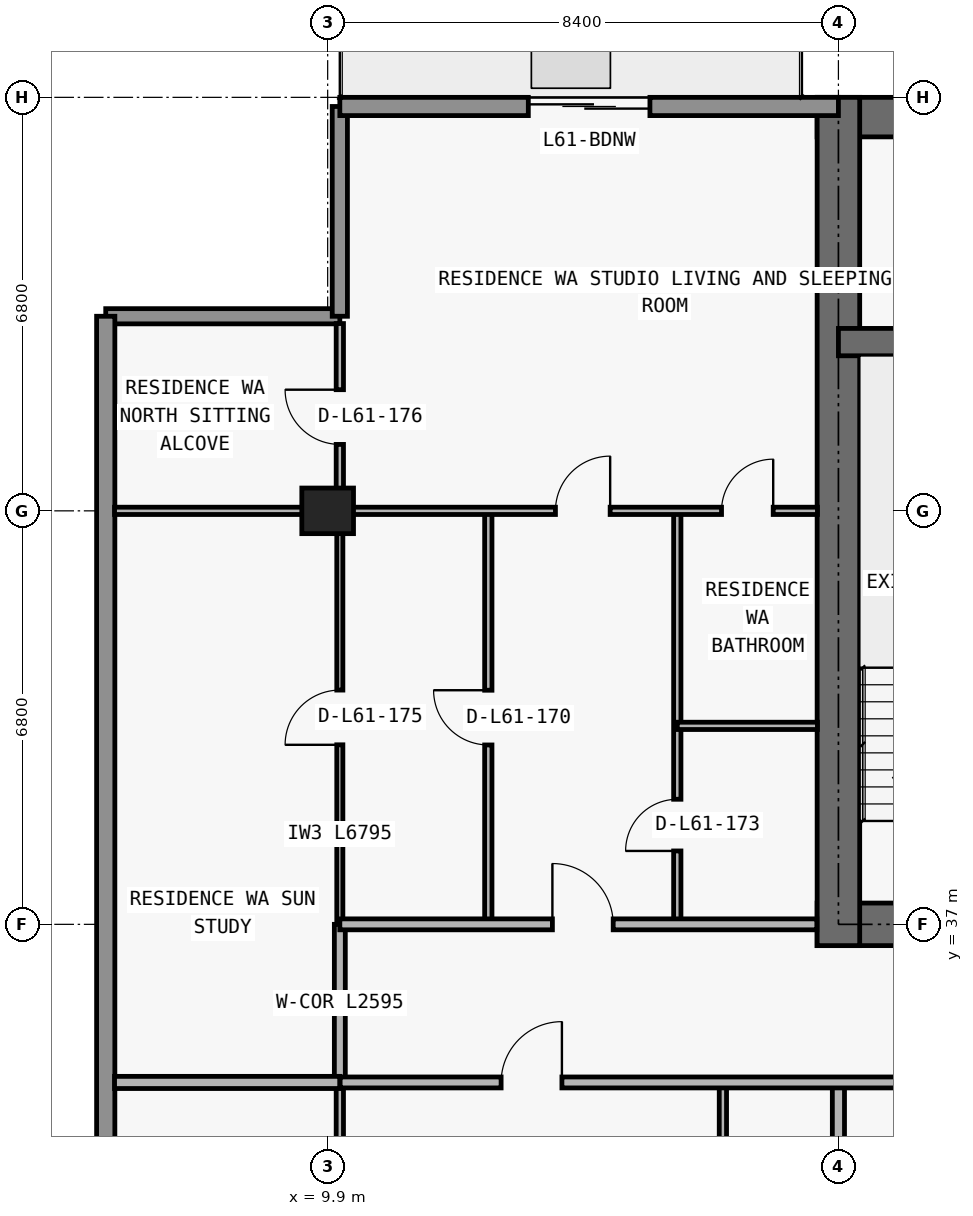
"""IFC4 building model, lengths in metres.
Left out: names, types, materials, properties, quantities, classifications, styles, units other than length and angle.
Written with IfcOpenShell. Run it as: python <this file> out.ifc"""

import sys

from ifc_helpers import new_model, si_unit, direction, frame, frame_2d, origin, origin_2d, place, context, subcontext, project, spatial, rectangle, extrude, element, fill, save


model = new_model("IFC4")
c1 = context("Model", 3, precision=1e-05, world=origin(), true_north=direction((0.0, 1.0)))
c2 = subcontext(c1, "Body", "Model", "MODEL_VIEW")
j1 = project(units=[si_unit("LENGTHUNIT", "METRE"), si_unit("PLANEANGLEUNIT", "RADIAN")], contexts=[c1])
p1 = place(None, origin())
s1 = spatial("IfcSite", under=j1, at=p1, CompositionType="ELEMENT")
p2 = place(p1, origin())
s2 = spatial("IfcBuilding", under=s1, at=p2, CompositionType="ELEMENT")
p3 = place(p2, frame((0.0, 0.0, 218.1)))
s3 = spatial("IfcBuildingStorey", under=s2, at=p3, CompositionType="ELEMENT", Elevation=218.1)
p4 = place(p3, frame((9.9, 43.8, 0.0), z_axis=(0.0, 0.0, 1.0), x_axis=(1.0, 0.0, 0.0)))
e1 = element("IfcColumn", 1, at=p4, inside=s3, PredefinedType="COLUMN", context=c2, shape_type="SweptSolid", body=[
    extrude(rectangle(XDim=0.85, YDim=0.75, at=origin_2d()), origin(), (0.0, 0.0, 1.0), 3.0),
])
p5 = place(p3, frame((17.95, 37.0, 0.0), z_axis=(0.0, 0.0, 1.0), x_axis=(1.0, 0.0, 0.0)))
e2 = element("IfcWall", 2, at=p5, inside=s3, PredefinedType="SHEAR", context=c2, shape_type="SweptSolid", body=[
    extrude(rectangle(XDim=41.9, YDim=0.7, at=frame_2d((20.95, 0.0))), origin(), (0.0, 0.0, 1.0), 3.0),
])
p6 = place(p5, frame((14.35, 0.0, 0.0)))
e3 = element("IfcOpeningElement", 3, at=p6, cuts=e2, PredefinedType="OPENING", context=c2, shape_type="SweptSolid", body=[
    extrude(rectangle(XDim=1.1, YDim=2.15, at=frame_2d((0.55, 1.075))), frame((0.0, 0.36, 0.0), z_axis=(0.0, -1.0, 0.0), x_axis=(1.0, 0.0, 0.0)), (0.0, 0.0, 1.0), 0.72),
])
p7 = place(p5, frame((6.2, 0.0, 0.0)))
e4 = element("IfcOpeningElement", 4, at=p7, cuts=e2, PredefinedType="OPENING", context=c2, shape_type="SweptSolid", body=[
    extrude(rectangle(XDim=1.05, YDim=2.15, at=frame_2d((0.525, 1.075))), frame((0.0, 0.36, 0.0), z_axis=(0.0, -1.0, 0.0), x_axis=(1.0, 0.0, 0.0)), (0.0, 0.0, 1.0), 0.72),
])
p8 = place(p5, frame((34.7, 0.0, 0.0)))
e5 = element("IfcOpeningElement", 5, at=p8, cuts=e2, PredefinedType="OPENING", context=c2, shape_type="SweptSolid", body=[
    extrude(rectangle(XDim=1.05, YDim=2.15, at=frame_2d((0.525, 1.075))), frame((0.0, 0.36, 0.0), z_axis=(0.0, -1.0, 0.0), x_axis=(1.0, 0.0, 0.0)), (0.0, 0.0, 1.0), 0.72),
])
p9 = place(p5, frame((10.812, 0.0, 0.0)))
e6 = element("IfcOpeningElement", 6, at=p9, cuts=e2, PredefinedType="OPENING", context=c2, shape_type="SweptSolid", body=[
    extrude(rectangle(XDim=1.05, YDim=2.15, at=frame_2d((0.525, 1.075))), frame((0.0, 0.36, 0.0), z_axis=(0.0, -1.0, 0.0), x_axis=(1.0, 0.0, 0.0)), (0.0, 0.0, 1.0), 0.72),
])
p10 = place(p5, frame((24.05, 0.0, 0.0)))
e7 = element("IfcOpeningElement", 7, at=p10, cuts=e2, PredefinedType="OPENING", context=c2, shape_type="SweptSolid", body=[
    extrude(rectangle(XDim=1.05, YDim=2.15, at=frame_2d((0.525, 1.075))), frame((0.0, 0.36, 0.0), z_axis=(0.0, -1.0, 0.0), x_axis=(1.0, 0.0, 0.0)), (0.0, 0.0, 1.0), 0.72),
])
p11 = place(p3, frame((17.95, 50.275, 0.0), z_axis=(0.0, 0.0, 1.0), x_axis=(1.0, 0.0, 0.0)))
e8 = element("IfcWall", 8, at=p11, inside=s3, PredefinedType="SHEAR", context=c2, shape_type="SweptSolid", body=[
    extrude(rectangle(XDim=41.9, YDim=0.65, at=frame_2d((20.95, 0.0))), origin(), (0.0, 0.0, 1.0), 3.0),
])
p12 = place(p3, frame((18.3, 36.65, 0.0), z_axis=(0.0, 0.0, 1.0), x_axis=(0.0, 1.0, 0.0)))
e9 = element("IfcWall", 9, at=p12, inside=s3, PredefinedType="SHEAR", context=c2, shape_type="SweptSolid", body=[
    extrude(rectangle(XDim=13.95, YDim=0.7, at=frame_2d((6.975, 0.0))), origin(), (0.0, 0.0, 1.0), 3.0),
])
p13 = place(p3, frame((18.3, 46.575, 0.0), z_axis=(0.0, 0.0, 1.0), x_axis=(1.0, 0.0, 0.0)))
e10 = element("IfcWall", 10, at=p13, inside=s3, PredefinedType="SHEAR", context=c2, shape_type="SweptSolid", body=[
    extrude(rectangle(XDim=41.2, YDim=0.45, at=frame_2d((20.6, 0.0))), origin(), (0.0, 0.0, 1.0), 3.0),
])
p14 = place(p13, frame((7.575, 0.0, 0.0)))
e11 = element("IfcOpeningElement", 11, at=p14, cuts=e10, PredefinedType="OPENING", context=c2, shape_type="SweptSolid", body=[
    extrude(rectangle(XDim=1.05, YDim=2.15, at=frame_2d((0.525, 1.075))), frame((0.0, 0.235, 0.0), z_axis=(0.0, -1.0, 0.0), x_axis=(1.0, 0.0, 0.0)), (0.0, 0.0, 1.0), 0.47),
])
p15 = place(p13, frame((32.625, 0.0, 0.0)))
e12 = element("IfcOpeningElement", 12, at=p15, cuts=e10, PredefinedType="OPENING", context=c2, shape_type="SweptSolid", body=[
    extrude(rectangle(XDim=1.05, YDim=2.15, at=frame_2d((0.525, 1.075))), frame((0.0, 0.235, 0.0), z_axis=(0.0, -1.0, 0.0), x_axis=(1.0, 0.0, 0.0)), (0.0, 0.0, 1.0), 0.47),
])
p16 = place(p3, frame((6.25, 47.0, 0.0), z_axis=(0.0, 0.0, 1.0), x_axis=(1.0, 0.0, 0.0)))
e13 = element("IfcWall", 13, at=p16, inside=s3, PredefinedType="ELEMENTEDWALL", context=c2, shape_type="SweptSolid", body=[
    extrude(rectangle(XDim=3.85, YDim=0.25, at=frame_2d((1.925, 0.0))), origin(), (0.0, 0.0, 1.0), 3.0),
])
p17 = place(p3, frame((10.1, 47.0, 0.0), z_axis=(0.0, 0.0, 1.0), x_axis=(0.0, 1.0, 0.0)))
e14 = element("IfcWall", 14, at=p17, inside=s3, PredefinedType="ELEMENTEDWALL", context=c2, shape_type="SweptSolid", body=[
    extrude(rectangle(XDim=3.45, YDim=0.25, at=frame_2d((1.725, 0.0))), origin(), (0.0, 0.0, 1.0), 3.0),
])
p18 = place(p3, frame((6.25, 29.1, 0.0), z_axis=(0.0, 0.0, 1.0), x_axis=(0.0, 1.0, 0.0)))
e15 = element("IfcWall", 15, at=p18, inside=s3, PredefinedType="STANDARD", context=c2, shape_type="SweptSolid", body=[
    extrude(rectangle(XDim=17.9, YDim=0.3, at=frame_2d((8.95, 0.0))), origin(), (0.0, 0.0, 1.0), 3.0),
])
p19 = place(p3, frame((10.1, 50.45, 0.0), z_axis=(0.0, 0.0, 1.0), x_axis=(1.0, 0.0, 0.0)))
e16 = element("IfcWall", 16, at=p19, inside=s3, PredefinedType="STANDARD", context=c2, shape_type="SweptSolid", body=[
    extrude(rectangle(XDim=8.2, YDim=0.3, at=frame_2d((4.1, 0.0))), origin(), (0.0, 0.0, 1.0), 3.0),
])
p20 = place(p19, frame((3.1, 0.0, 0.0)))
e17 = element("IfcOpeningElement", 17, at=p20, cuts=e16, PredefinedType="OPENING", context=c2, shape_type="SweptSolid", body=[
    extrude(rectangle(XDim=2.0, YDim=2.3, at=frame_2d((1.0, 1.15))), frame((0.0, 0.16, 0.0), z_axis=(0.0, -1.0, 0.0), x_axis=(1.0, 0.0, 0.0)), (0.0, 0.0, 1.0), 0.32),
])
p21 = place(p3, frame((10.1, 29.1, 0.0), z_axis=(0.0, 0.0, 1.0), x_axis=(0.0, 1.0, 0.0)))
e18 = element("IfcWall", 18, at=p21, inside=s3, PredefinedType="PARTITIONING", context=c2, shape_type="SweptSolid", body=[
    extrude(rectangle(XDim=5.3, YDim=0.12, at=frame_2d((2.65, 0.0))), origin(), (0.0, 0.0, 1.0), 2.213),
])
p22 = place(p3, frame((10.1, 34.405, 0.0), z_axis=(0.0, 0.0, 1.0), x_axis=(0.0, 1.0, 0.0)))
e19 = element("IfcWall", 19, at=p22, inside=s3, PredefinedType="PARTITIONING", context=c2, shape_type="SweptSolid", body=[
    extrude(rectangle(XDim=2.595, YDim=0.18, at=frame_2d((1.297, 0.0))), origin(), (0.0, 0.0, 1.0), 2.213),
])
p23 = place(p3, frame((10.1, 37.005, 0.0), z_axis=(0.0, 0.0, 1.0), x_axis=(0.0, 1.0, 0.0)))
e20 = element("IfcWall", 20, at=p23, inside=s3, PredefinedType="MOVABLE", context=c2, shape_type="SweptSolid", body=[
    extrude(rectangle(XDim=6.795, YDim=0.1, at=frame_2d((3.397, 0.0))), origin(), (0.0, 0.0, 1.0), 2.213),
])
p24 = place(p23, frame((2.948, 0.0, 0.0)))
e21 = element("IfcOpeningElement", 21, at=p24, cuts=e20, PredefinedType="OPENING", context=c2, shape_type="SweptSolid", body=[
    extrude(rectangle(XDim=0.9, YDim=2.15, at=frame_2d((0.45, 1.075))), frame((0.0, 0.06, 0.0), z_axis=(0.0, -1.0, 0.0), x_axis=(1.0, 0.0, 0.0)), (0.0, 0.0, 1.0), 0.12),
])
p25 = place(p3, frame((10.1, 43.805, 0.0), z_axis=(0.0, 0.0, 1.0), x_axis=(0.0, 1.0, 0.0)))
e22 = element("IfcWall", 22, at=p25, inside=s3, PredefinedType="PARTITIONING", context=c2, shape_type="SweptSolid", body=[
    extrude(rectangle(XDim=3.075, YDim=0.12, at=frame_2d((1.538, 0.0))), origin(), (0.0, 0.0, 1.0), 3.0),
])
p26 = place(p25, frame((1.087, 0.0, 0.0)))
e23 = element("IfcOpeningElement", 23, at=p26, cuts=e22, PredefinedType="OPENING", context=c2, shape_type="SweptSolid", body=[
    extrude(rectangle(XDim=0.9, YDim=2.15, at=frame_2d((0.45, 1.075))), frame((0.0, 0.07, 0.0), z_axis=(0.0, -1.0, 0.0), x_axis=(1.0, 0.0, 0.0)), (0.0, 0.0, 1.0), 0.14),
])
p27 = place(p3, frame((12.542, 37.0, 0.0), z_axis=(0.0, 0.0, 1.0), x_axis=(0.0, 1.0, 0.0)))
e24 = element("IfcWall", 24, at=p27, inside=s3, PredefinedType="PARTITIONING", context=c2, shape_type="SweptSolid", body=[
    extrude(rectangle(XDim=6.8, YDim=0.12, at=frame_2d((3.4, 0.0))), origin(), (0.0, 0.0, 1.0), 3.0),
])
p28 = place(p27, frame((2.95, 0.0, 0.0)))
e25 = element("IfcOpeningElement", 25, at=p28, cuts=e24, PredefinedType="OPENING", context=c2, shape_type="SweptSolid", body=[
    extrude(rectangle(XDim=0.9, YDim=2.15, at=frame_2d((0.45, 1.075))), frame((0.0, 0.07, 0.0), z_axis=(0.0, -1.0, 0.0), x_axis=(1.0, 0.0, 0.0)), (0.0, 0.0, 1.0), 0.14),
])
p29 = place(p3, frame((15.65, 37.0, 0.0), z_axis=(0.0, 0.0, 1.0), x_axis=(0.0, 1.0, 0.0)))
e26 = element("IfcWall", 26, at=p29, inside=s3, PredefinedType="PARTITIONING", context=c2, shape_type="SweptSolid", body=[
    extrude(rectangle(XDim=6.8, YDim=0.12, at=frame_2d((3.4, 0.0))), origin(), (0.0, 0.0, 1.0), 3.0),
])
p30 = place(p29, frame((1.207, 0.0, 0.0)))
e27 = element("IfcOpeningElement", 27, at=p30, cuts=e26, PredefinedType="OPENING", context=c2, shape_type="SweptSolid", body=[
    extrude(rectangle(XDim=0.85, YDim=2.1, at=frame_2d((0.425, 1.05))), frame((0.0, 0.07, 0.0), z_axis=(0.0, -1.0, 0.0), x_axis=(1.0, 0.0, 0.0)), (0.0, 0.0, 1.0), 0.14),
])
p31 = place(p3, frame((16.4, 29.1, 0.0), z_axis=(0.0, 0.0, 1.0), x_axis=(0.0, 1.0, 0.0)))
e28 = element("IfcWall", 28, at=p31, inside=s3, PredefinedType="PARTITIONING", context=c2, shape_type="SweptSolid", body=[
    extrude(rectangle(XDim=5.3, YDim=0.12, at=frame_2d((2.65, 0.0))), origin(), (0.0, 0.0, 1.0), 2.675),
])
p32 = place(p31, frame((2.225, 0.0, 0.0)))
e29 = element("IfcOpeningElement", 29, at=p32, cuts=e28, PredefinedType="OPENING", context=c2, shape_type="SweptSolid", body=[
    extrude(rectangle(XDim=0.85, YDim=2.1, at=frame_2d((0.425, 1.05))), frame((0.0, 0.07, 0.0), z_axis=(0.0, -1.0, 0.0), x_axis=(1.0, 0.0, 0.0)), (0.0, 0.0, 1.0), 0.14),
])
p33 = place(p3, frame((18.3, 29.1, 0.0), z_axis=(0.0, 0.0, 1.0), x_axis=(0.0, 1.0, 0.0)))
e30 = element("IfcWall", 30, at=p33, inside=s3, PredefinedType="PARTITIONING", context=c2, shape_type="SweptSolid", body=[
    extrude(rectangle(XDim=5.3, YDim=0.2, at=frame_2d((2.65, 0.0))), origin(), (0.0, 0.0, 1.0), 2.213),
])
p34 = place(p3, frame((6.395, 34.4, 0.0), z_axis=(0.0, 0.0, 1.0), x_axis=(1.0, 0.0, 0.0)))
e31 = element("IfcWall", 31, at=p34, inside=s3, PredefinedType="PARTITIONING", context=c2, shape_type="SweptSolid", body=[
    extrude(rectangle(XDim=3.705, YDim=0.2, at=frame_2d((1.853, 0.0))), origin(), (0.0, 0.0, 1.0), 3.0),
])
p35 = place(p3, frame((10.105, 34.4, 0.0), z_axis=(0.0, 0.0, 1.0), x_axis=(1.0, 0.0, 0.0)))
e32 = element("IfcWall", 32, at=p35, inside=s3, PredefinedType="PARTITIONING", context=c2, shape_type="SweptSolid", body=[
    extrude(rectangle(XDim=29.099, YDim=0.18, at=frame_2d((14.55, 0.0))), origin(), (0.0, 0.0, 1.0), 3.0),
])
p36 = place(p35, frame((2.647, 0.0, 0.0)))
e33 = element("IfcOpeningElement", 33, at=p36, cuts=e32, PredefinedType="OPENING", context=c2, shape_type="SweptSolid", body=[
    extrude(rectangle(XDim=1.0, YDim=2.2, at=frame_2d((0.5, 1.1))), frame((0.0, 0.1, 0.0), z_axis=(0.0, -1.0, 0.0), x_axis=(1.0, 0.0, 0.0)), (0.0, 0.0, 1.0), 0.2),
])
p37 = place(p35, frame((11.056, 0.0, 0.0)))
e34 = element("IfcOpeningElement", 34, at=p37, cuts=e32, PredefinedType="OPENING", context=c2, shape_type="SweptSolid", body=[
    extrude(rectangle(XDim=1.0, YDim=2.2, at=frame_2d((0.5, 1.1))), frame((0.0, 0.1, 0.0), z_axis=(0.0, -1.0, 0.0), x_axis=(1.0, 0.0, 0.0)), (0.0, 0.0, 1.0), 0.2),
])
p38 = place(p35, frame((19.334, 0.0, 0.0)))
e35 = element("IfcOpeningElement", 35, at=p38, cuts=e32, PredefinedType="OPENING", context=c2, shape_type="SweptSolid", body=[
    extrude(rectangle(XDim=1.0, YDim=2.2, at=frame_2d((0.5, 1.1))), frame((0.0, 0.1, 0.0), z_axis=(0.0, -1.0, 0.0), x_axis=(1.0, 0.0, 0.0)), (0.0, 0.0, 1.0), 0.2),
])
p39 = place(p35, frame((26.547, 0.0, 0.0)))
e36 = element("IfcOpeningElement", 36, at=p39, cuts=e32, PredefinedType="OPENING", context=c2, shape_type="SweptSolid", body=[
    extrude(rectangle(XDim=1.0, YDim=2.2, at=frame_2d((0.5, 1.1))), frame((0.0, 0.1, 0.0), z_axis=(0.0, -1.0, 0.0), x_axis=(1.0, 0.0, 0.0)), (0.0, 0.0, 1.0), 0.2),
])
p40 = place(p3, frame((10.1, 37.0, 0.0), z_axis=(0.0, 0.0, 1.0), x_axis=(1.0, 0.0, 0.0)))
e37 = element("IfcWall", 37, at=p40, inside=s3, PredefinedType="PARTITIONING", context=c2, shape_type="SweptSolid", body=[
    extrude(rectangle(XDim=7.845, YDim=0.18, at=frame_2d((3.922, 0.0))), origin(), (0.0, 0.0, 1.0), 3.0),
])
p41 = place(p40, frame((3.496, 0.0, 0.0)))
e38 = element("IfcOpeningElement", 38, at=p41, cuts=e37, PredefinedType="OPENING", context=c2, shape_type="SweptSolid", body=[
    extrude(rectangle(XDim=1.0, YDim=2.2, at=frame_2d((0.5, 1.1))), frame((0.0, 0.1, 0.0), z_axis=(0.0, -1.0, 0.0), x_axis=(1.0, 0.0, 0.0)), (0.0, 0.0, 1.0), 0.2),
])
p42 = place(p3, frame((15.65, 40.264, 0.0), z_axis=(0.0, 0.0, 1.0), x_axis=(1.0, 0.0, 0.0)))
e39 = element("IfcWall", 39, at=p42, inside=s3, PredefinedType="PARTITIONING", context=c2, shape_type="SweptSolid", body=[
    extrude(rectangle(XDim=2.305, YDim=0.12, at=frame_2d((1.153, 0.0))), origin(), (0.0, 0.0, 1.0), 3.0),
])
p43 = place(p3, frame((6.395, 43.8, 0.0), z_axis=(0.0, 0.0, 1.0), x_axis=(1.0, 0.0, 0.0)))
e40 = element("IfcWall", 40, at=p43, inside=s3, PredefinedType="PARTITIONING", context=c2, shape_type="SweptSolid", body=[
    extrude(rectangle(XDim=11.56, YDim=0.12, at=frame_2d((5.78, 0.0))), origin(), (0.0, 0.0, 1.0), 2.368),
])
p44 = place(p43, frame((7.251, 0.0, 0.0)))
e41 = element("IfcOpeningElement", 41, at=p44, cuts=e40, PredefinedType="OPENING", context=c2, shape_type="SweptSolid", body=[
    extrude(rectangle(XDim=0.9, YDim=2.15, at=frame_2d((0.45, 1.075))), frame((0.0, 0.07, 0.0), z_axis=(0.0, -1.0, 0.0), x_axis=(1.0, 0.0, 0.0)), (0.0, 0.0, 1.0), 0.14),
])
p45 = place(p43, frame((9.982, 0.0, 0.0)))
e42 = element("IfcOpeningElement", 42, at=p45, cuts=e40, PredefinedType="OPENING", context=c2, shape_type="SweptSolid", body=[
    extrude(rectangle(XDim=0.85, YDim=2.1, at=frame_2d((0.425, 1.05))), frame((0.0, 0.07, 0.0), z_axis=(0.0, -1.0, 0.0), x_axis=(1.0, 0.0, 0.0)), (0.0, 0.0, 1.0), 0.14),
])
p46 = place(p20, origin())
e43 = element("IfcDoor", 43, at=p46, inside=s3, OperationType="DOUBLE_DOOR_SLIDING", PredefinedType="DOOR", context=c2, shape_type="SweptSolid", body=[
    extrude(rectangle(XDim=2.0, YDim=2.3, at=frame_2d((1.0, 1.15))), frame((0.0, 0.025, 0.0), z_axis=(0.0, -1.0, 0.0), x_axis=(1.0, 0.0, 0.0)), (0.0, 0.0, 1.0), 0.05),
])
fill(e17, e43)
p47 = place(p36, origin())
e44 = element("IfcDoor", 44, at=p47, inside=s3, OperationType="SINGLE_SWING_RIGHT", PredefinedType="DOOR", context=c2, shape_type="SweptSolid", body=[
    extrude(rectangle(XDim=1.0, YDim=2.2, at=frame_2d((0.5, 1.1))), frame((0.0, 0.025, 0.0), z_axis=(0.0, -1.0, 0.0), x_axis=(1.0, 0.0, 0.0)), (0.0, 0.0, 1.0), 0.05),
])
fill(e33, e44)
p48 = place(p28, origin())
e45 = element("IfcDoor", 45, at=p48, inside=s3, OperationType="SINGLE_SWING_RIGHT", PredefinedType="DOOR", context=c2, shape_type="SweptSolid", body=[
    extrude(rectangle(XDim=0.9, YDim=2.15, at=frame_2d((0.45, 1.075))), frame((0.0, 0.025, 0.0), z_axis=(0.0, -1.0, 0.0), x_axis=(1.0, 0.0, 0.0)), (0.0, 0.0, 1.0), 0.05),
])
fill(e25, e45)
p49 = place(p41, origin())
e46 = element("IfcDoor", 46, at=p49, inside=s3, OperationType="SINGLE_SWING_LEFT", PredefinedType="DOOR", context=c2, shape_type="SweptSolid", body=[
    extrude(rectangle(XDim=1.0, YDim=2.2, at=frame_2d((0.5, 1.1))), frame((0.0, 0.025, 0.0), z_axis=(0.0, -1.0, 0.0), x_axis=(1.0, 0.0, 0.0)), (0.0, 0.0, 1.0), 0.05),
])
fill(e38, e46)
p50 = place(p44, origin())
e47 = element("IfcDoor", 47, at=p50, inside=s3, OperationType="SINGLE_SWING_RIGHT", PredefinedType="DOOR", context=c2, shape_type="SweptSolid", body=[
    extrude(rectangle(XDim=0.9, YDim=2.15, at=frame_2d((0.45, 1.075))), frame((0.0, 0.025, 0.0), z_axis=(0.0, -1.0, 0.0), x_axis=(1.0, 0.0, 0.0)), (0.0, 0.0, 1.0), 0.05),
])
fill(e41, e47)
p51 = place(p30, origin())
e48 = element("IfcDoor", 48, at=p51, inside=s3, OperationType="SINGLE_SWING_LEFT", PredefinedType="DOOR", context=c2, shape_type="SweptSolid", body=[
    extrude(rectangle(XDim=0.85, YDim=2.1, at=frame_2d((0.425, 1.05))), frame((0.0, 0.025, 0.0), z_axis=(0.0, -1.0, 0.0), x_axis=(1.0, 0.0, 0.0)), (0.0, 0.0, 1.0), 0.05),
])
fill(e27, e48)
p52 = place(p45, origin())
e49 = element("IfcDoor", 49, at=p52, inside=s3, OperationType="SINGLE_SWING_RIGHT", PredefinedType="DOOR", context=c2, shape_type="SweptSolid", body=[
    extrude(rectangle(XDim=0.85, YDim=2.1, at=frame_2d((0.425, 1.05))), frame((0.0, 0.025, 0.0), z_axis=(0.0, -1.0, 0.0), x_axis=(1.0, 0.0, 0.0)), (0.0, 0.0, 1.0), 0.05),
])
fill(e42, e49)
p53 = place(p24, origin())
e50 = element("IfcDoor", 50, at=p53, inside=s3, OperationType="SINGLE_SWING_LEFT", PredefinedType="DOOR", context=c2, shape_type="SweptSolid", body=[
    extrude(rectangle(XDim=0.9, YDim=2.15, at=frame_2d((0.45, 1.075))), frame((0.0, 0.025, 0.0), z_axis=(0.0, -1.0, 0.0), x_axis=(1.0, 0.0, 0.0)), (0.0, 0.0, 1.0), 0.05),
])
fill(e21, e50)
p54 = place(p26, origin())
e51 = element("IfcDoor", 51, at=p54, inside=s3, OperationType="SINGLE_SWING_RIGHT", PredefinedType="DOOR", context=c2, shape_type="SweptSolid", body=[
    extrude(rectangle(XDim=0.9, YDim=2.15, at=frame_2d((0.45, 1.075))), frame((0.0, 0.025, 0.0), z_axis=(0.0, -1.0, 0.0), x_axis=(1.0, 0.0, 0.0)), (0.0, 0.0, 1.0), 0.05),
])
fill(e23, e51)
save(model, sys.argv[1])
